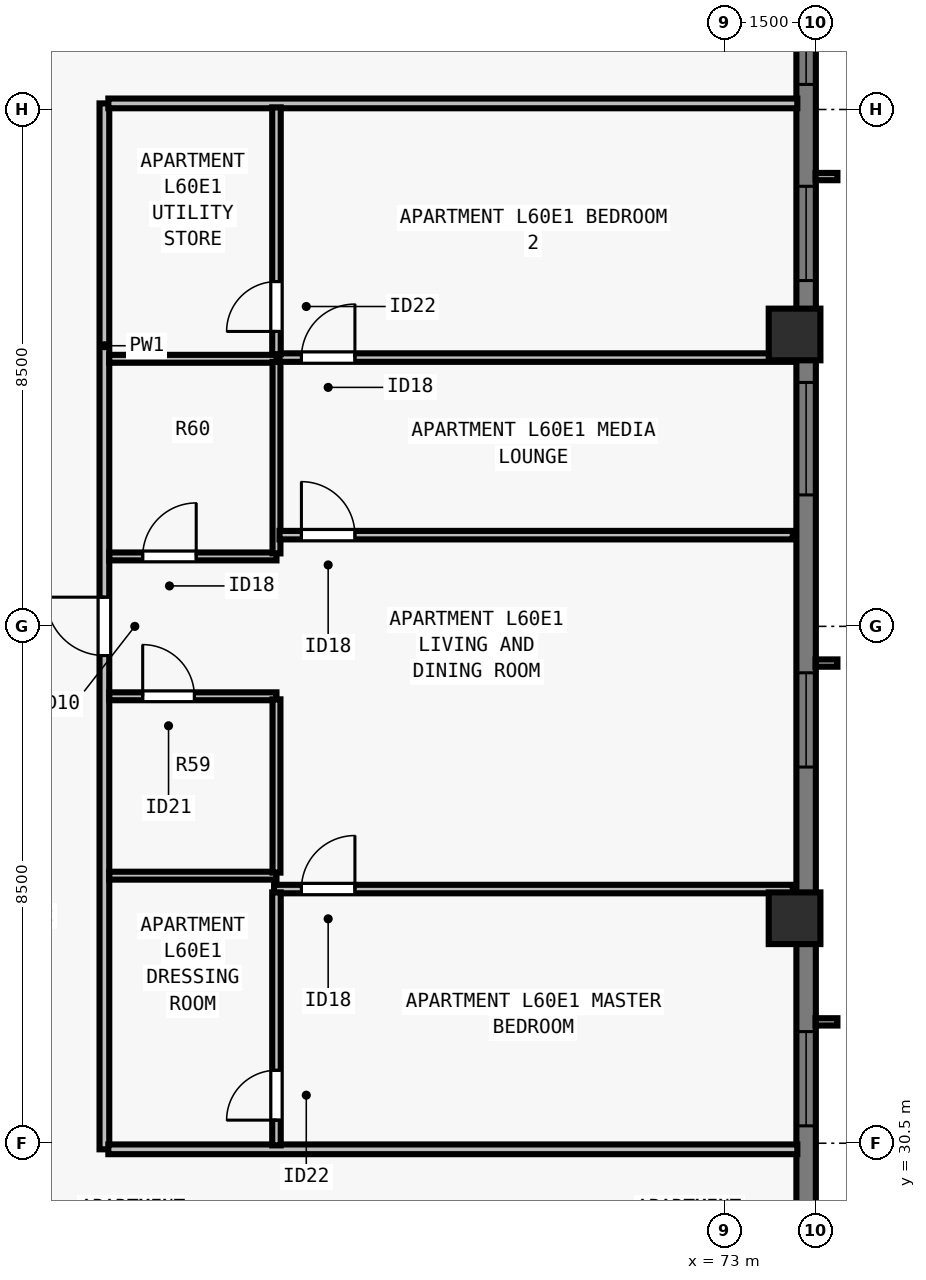
"""IFC4 building model, lengths in metres.
Left out: names, types, materials, properties, quantities, classifications, styles, units other than length and angle.
Written with IfcOpenShell. Run it as: python <this file> out.ifc"""

import sys

from ifc_helpers import new_model, si_unit, direction, frame, frame_2d, origin, origin_2d, place, context, subcontext, project, spatial, rectangle, extrude, element, fill, save


model = new_model("IFC4")
c1 = context("Model", 3, precision=1e-05, world=origin(), true_north=direction((0.0, 1.0)))
c2 = subcontext(c1, "Body", "Model", "MODEL_VIEW")
j1 = project(units=[si_unit("LENGTHUNIT", "METRE"), si_unit("PLANEANGLEUNIT", "RADIAN")], contexts=[c1])
p1 = place(None, origin())
s1 = spatial("IfcSite", under=j1, at=p1, CompositionType="ELEMENT")
p2 = place(p1, origin())
s2 = spatial("IfcBuilding", under=s1, at=p2, CompositionType="ELEMENT")
p3 = place(p2, frame((0.0, 0.0, 220.0)))
s3 = spatial("IfcBuildingStorey", under=s2, at=p3, CompositionType="ELEMENT", Elevation=220.0)
for number, where, z_axis, x_axis in (
    (1, (74.15, 34.2, 0.0), (0.0, 0.0, 1.0), (0.0, 1.0, 0.0)),
    (2, (74.15, 43.8, 0.0), (0.0, 0.0, 1.0), (0.0, 1.0, 0.0)),
):
    element("IfcColumn", number, at=place(p3, frame(where, z_axis=z_axis, x_axis=x_axis)), inside=s3, PredefinedType="COLUMN", context=c2, shape_type="SweptSolid", body=[
        extrude(rectangle(XDim=0.85, YDim=0.85, at=origin_2d()), origin(), (0.0, 0.0, 1.0), 3.5),
    ])
p4 = place(p3, frame((74.34, 56.5, 0.0), z_axis=(0.0, 0.0, 1.0), x_axis=(0.0, -1.0, 0.0)))
e3 = element("IfcWall", 3, at=p4, inside=s3, PredefinedType="SOLIDWALL", context=c2, shape_type="SweptSolid", body=[
    extrude(rectangle(XDim=34.702, YDim=0.32, at=frame_2d((17.351, 0.0))), origin(), (0.0, 0.0, 1.0), 3.29),
])
p5 = place(p4, frame((4.312, 0.0, 0.8)))
e4 = element("IfcOpeningElement", 4, at=p5, cuts=e3, PredefinedType="OPENING", context=c2, shape_type="SweptSolid", body=[
    extrude(rectangle(XDim=1.55, YDim=1.678, at=frame_2d((0.775, 0.839))), frame((0.0, 0.17, 0.0), z_axis=(0.0, -1.0, 0.0), x_axis=(1.0, 0.0, 0.0)), (0.0, 0.0, 1.0), 0.34),
])
p6 = place(p4, frame((6.738, 0.0, 0.8)))
e5 = element("IfcOpeningElement", 5, at=p6, cuts=e3, PredefinedType="OPENING", context=c2, shape_type="SweptSolid", body=[
    extrude(rectangle(XDim=1.85, YDim=1.678, at=frame_2d((0.925, 0.839))), frame((0.0, 0.17, 0.0), z_axis=(0.0, -1.0, 0.0), x_axis=(1.0, 0.0, 0.0)), (0.0, 0.0, 1.0), 0.34),
])
p7 = place(p4, frame((10.263, 0.0, 0.8)))
e6 = element("IfcOpeningElement", 6, at=p7, cuts=e3, PredefinedType="OPENING", context=c2, shape_type="SweptSolid", body=[
    extrude(rectangle(XDim=1.55, YDim=1.678, at=frame_2d((0.775, 0.839))), frame((0.0, 0.17, 0.0), z_axis=(0.0, -1.0, 0.0), x_axis=(1.0, 0.0, 0.0)), (0.0, 0.0, 1.0), 0.34),
])
p8 = place(p4, frame((13.488, 0.0, 0.8)))
e7 = element("IfcOpeningElement", 7, at=p8, cuts=e3, PredefinedType="OPENING", context=c2, shape_type="SweptSolid", body=[
    extrude(rectangle(XDim=1.85, YDim=1.678, at=frame_2d((0.925, 0.839))), frame((0.0, 0.17, 0.0), z_axis=(0.0, -1.0, 0.0), x_axis=(1.0, 0.0, 0.0)), (0.0, 0.0, 1.0), 0.34),
])
p9 = place(p4, frame((18.264, 0.0, 0.8)))
e8 = element("IfcOpeningElement", 8, at=p9, cuts=e3, PredefinedType="OPENING", context=c2, shape_type="SweptSolid", body=[
    extrude(rectangle(XDim=1.55, YDim=1.678, at=frame_2d((0.775, 0.839))), frame((0.0, 0.17, 0.0), z_axis=(0.0, -1.0, 0.0), x_axis=(1.0, 0.0, 0.0)), (0.0, 0.0, 1.0), 0.34),
])
p10 = place(p4, frame((24.164, 0.0, 0.8)))
e9 = element("IfcOpeningElement", 9, at=p10, cuts=e3, PredefinedType="OPENING", context=c2, shape_type="SweptSolid", body=[
    extrude(rectangle(XDim=1.55, YDim=1.678, at=frame_2d((0.775, 0.839))), frame((0.0, 0.17, 0.0), z_axis=(0.0, -1.0, 0.0), x_axis=(1.0, 0.0, 0.0)), (0.0, 0.0, 1.0), 0.34),
])
p11 = place(p3, frame((62.8, 30.4, 0.0), z_axis=(0.0, 0.0, 1.0), x_axis=(0.0, 1.0, 0.0)))
e10 = element("IfcWall", 10, at=p11, inside=s3, PredefinedType="PARTITIONING", context=c2, shape_type="SweptSolid", body=[
    extrude(rectangle(XDim=17.2, YDim=0.16, at=frame_2d((8.6, 0.0))), origin(), (0.0, 0.0, 1.0), 3.29),
])
p12 = place(p11, frame((8.12, 0.0, 0.0)))
e11 = element("IfcOpeningElement", 11, at=p12, cuts=e10, PredefinedType="OPENING", context=c2, shape_type="SweptSolid", body=[
    extrude(rectangle(XDim=0.96, YDim=2.18, at=frame_2d((0.48, 1.09))), frame((0.0, 0.09, 0.0), z_axis=(0.0, -1.0, 0.0), x_axis=(1.0, 0.0, 0.0)), (0.0, 0.0, 1.0), 0.18),
])
for number, where, z_axis, x_axis in (
    (12, (62.865, 30.4, 0.0), (0.0, 0.0, 1.0), (1.0, 0.0, 0.0)),
    (13, (62.865, 47.6, 0.0), (0.0, 0.0, 1.0), (1.0, 0.0, 0.0)),
):
    element("IfcWall", number, at=place(p3, frame(where, z_axis=z_axis, x_axis=x_axis)), inside=s3, PredefinedType="PARTITIONING", context=c2, shape_type="SweptSolid", body=[
        extrude(rectangle(XDim=11.33, YDim=0.16, at=frame_2d((5.665, 0.0))), origin(), (0.0, 0.0, 1.0), 3.29),
    ])
p13 = place(p3, frame((62.88, 34.9, 0.0), z_axis=(0.0, 0.0, 1.0), x_axis=(1.0, 0.0, 0.0)))
e14 = element("IfcWall", 14, at=p13, inside=s3, PredefinedType="PLUMBINGWALL", context=c2, shape_type="SweptSolid", body=[
    extrude(rectangle(XDim=2.75, YDim=0.13, at=frame_2d((1.375, 0.0))), origin(), (0.0, 0.0, 1.0), 3.29),
])
p14 = place(p3, frame((62.88, 37.85, 0.0), z_axis=(0.0, 0.0, 1.0), x_axis=(1.0, 0.0, 0.0)))
e15 = element("IfcWall", 15, at=p14, inside=s3, PredefinedType="PLUMBINGWALL", context=c2, shape_type="SweptSolid", body=[
    extrude(rectangle(XDim=2.75, YDim=0.13, at=frame_2d((1.375, 0.0))), origin(), (0.0, 0.0, 1.0), 3.29),
])
p15 = place(p14, frame((0.55, 0.0, 0.0)))
e16 = element("IfcOpeningElement", 16, at=p15, cuts=e15, PredefinedType="OPENING", context=c2, shape_type="SweptSolid", body=[
    extrude(rectangle(XDim=0.85, YDim=2.08, at=frame_2d((0.425, 1.04))), frame((0.0, 0.075, 0.0), z_axis=(0.0, -1.0, 0.0), x_axis=(1.0, 0.0, 0.0)), (0.0, 0.0, 1.0), 0.15),
])
p16 = place(p3, frame((65.63, 34.95, 0.0), z_axis=(0.0, 0.0, 1.0), x_axis=(0.0, 1.0, 0.0)))
e17 = element("IfcWall", 17, at=p16, inside=s3, PredefinedType="PLUMBINGWALL", context=c2, shape_type="SweptSolid", body=[
    extrude(rectangle(XDim=2.85, YDim=0.13, at=frame_2d((1.425, 0.0))), origin(), (0.0, 0.0, 1.0), 3.29),
])
p17 = place(p3, frame((62.88, 43.4, 0.0), z_axis=(0.0, 0.0, 1.0), x_axis=(1.0, 0.0, 0.0)))
e18 = element("IfcWall", 18, at=p17, inside=s3, PredefinedType="PLUMBINGWALL", context=c2, shape_type="SweptSolid", body=[
    extrude(rectangle(XDim=2.75, YDim=0.13, at=frame_2d((1.375, 0.0))), origin(), (0.0, 0.0, 1.0), 3.29),
])
p18 = place(p3, frame((62.88, 40.15, 0.0), z_axis=(0.0, 0.0, 1.0), x_axis=(1.0, 0.0, 0.0)))
e19 = element("IfcWall", 19, at=p18, inside=s3, PredefinedType="PLUMBINGWALL", context=c2, shape_type="SweptSolid", body=[
    extrude(rectangle(XDim=2.75, YDim=0.13, at=frame_2d((1.375, 0.0))), origin(), (0.0, 0.0, 1.0), 3.29),
])
p19 = place(p18, frame((0.55, 0.0, 0.0)))
e20 = element("IfcOpeningElement", 20, at=p19, cuts=e19, PredefinedType="OPENING", context=c2, shape_type="SweptSolid", body=[
    extrude(rectangle(XDim=0.88, YDim=2.1, at=frame_2d((0.44, 1.05))), frame((0.0, 0.075, 0.0), z_axis=(0.0, -1.0, 0.0), x_axis=(1.0, 0.0, 0.0)), (0.0, 0.0, 1.0), 0.15),
])
p20 = place(p3, frame((65.63, 40.2, 0.0), z_axis=(0.0, 0.0, 1.0), x_axis=(0.0, 1.0, 0.0)))
e21 = element("IfcWall", 21, at=p20, inside=s3, PredefinedType="PLUMBINGWALL", context=c2, shape_type="SweptSolid", body=[
    extrude(rectangle(XDim=3.15, YDim=0.13, at=frame_2d((1.575, 0.0))), origin(), (0.0, 0.0, 1.0), 3.29),
])
p21 = place(p3, frame((65.59, 34.68, 0.0), z_axis=(0.0, 0.0, 1.0), x_axis=(1.0, 0.0, 0.0)))
e22 = element("IfcWall", 22, at=p21, inside=s3, PredefinedType="PARTITIONING", context=c2, shape_type="SweptSolid", body=[
    extrude(rectangle(XDim=8.53, YDim=0.14, at=frame_2d((4.265, 0.0))), origin(), (0.0, 0.0, 1.0), 3.29),
])
p22 = place(p21, frame((0.45, 0.0, 0.0)))
e23 = element("IfcOpeningElement", 23, at=p22, cuts=e22, PredefinedType="OPENING", context=c2, shape_type="SweptSolid", body=[
    extrude(rectangle(XDim=0.88, YDim=2.1, at=frame_2d((0.44, 1.05))), frame((0.0, 0.08, 0.0), z_axis=(0.0, -1.0, 0.0), x_axis=(1.0, 0.0, 0.0)), (0.0, 0.0, 1.0), 0.16),
])
p23 = place(p3, frame((65.63, 30.465, 0.0), z_axis=(0.0, 0.0, 1.0), x_axis=(0.0, 1.0, 0.0)))
e24 = element("IfcWall", 24, at=p23, inside=s3, PredefinedType="PARTITIONING", context=c2, shape_type="SweptSolid", body=[
    extrude(rectangle(XDim=4.16, YDim=0.14, at=frame_2d((2.08, 0.0))), origin(), (0.0, 0.0, 1.0), 3.29),
])
p24 = place(p23, frame((0.415, 0.0, 0.0)))
e25 = element("IfcOpeningElement", 25, at=p24, cuts=e24, PredefinedType="OPENING", context=c2, shape_type="SweptSolid", body=[
    extrude(rectangle(XDim=0.82, YDim=2.1, at=frame_2d((0.41, 1.05))), frame((0.0, 0.08, 0.0), z_axis=(0.0, -1.0, 0.0), x_axis=(1.0, 0.0, 0.0)), (0.0, 0.0, 1.0), 0.16),
])
p25 = place(p3, frame((65.68, 43.42, 0.0), z_axis=(0.0, 0.0, 1.0), x_axis=(1.0, 0.0, 0.0)))
e26 = element("IfcWall", 26, at=p25, inside=s3, PredefinedType="PARTITIONING", context=c2, shape_type="SweptSolid", body=[
    extrude(rectangle(XDim=8.44, YDim=0.14, at=frame_2d((4.22, 0.0))), origin(), (0.0, 0.0, 1.0), 3.29),
])
p26 = place(p25, frame((0.36, 0.0, 0.0)))
e27 = element("IfcOpeningElement", 27, at=p26, cuts=e26, PredefinedType="OPENING", context=c2, shape_type="SweptSolid", body=[
    extrude(rectangle(XDim=0.88, YDim=2.1, at=frame_2d((0.44, 1.05))), frame((0.0, 0.08, 0.0), z_axis=(0.0, -1.0, 0.0), x_axis=(1.0, 0.0, 0.0)), (0.0, 0.0, 1.0), 0.16),
])
p27 = place(p3, frame((65.63, 43.475, 0.0), z_axis=(0.0, 0.0, 1.0), x_axis=(0.0, 1.0, 0.0)))
e28 = element("IfcWall", 28, at=p27, inside=s3, PredefinedType="PARTITIONING", context=c2, shape_type="SweptSolid", body=[
    extrude(rectangle(XDim=4.06, YDim=0.14, at=frame_2d((2.03, 0.0))), origin(), (0.0, 0.0, 1.0), 3.29),
])
p28 = place(p27, frame((0.375, 0.0, 0.0)))
e29 = element("IfcOpeningElement", 29, at=p28, cuts=e28, PredefinedType="OPENING", context=c2, shape_type="SweptSolid", body=[
    extrude(rectangle(XDim=0.82, YDim=2.1, at=frame_2d((0.41, 1.05))), frame((0.0, 0.08, 0.0), z_axis=(0.0, -1.0, 0.0), x_axis=(1.0, 0.0, 0.0)), (0.0, 0.0, 1.0), 0.16),
])
p29 = place(p3, frame((65.68, 40.5, 0.0), z_axis=(0.0, 0.0, 1.0), x_axis=(1.0, 0.0, 0.0)))
e30 = element("IfcWall", 30, at=p29, inside=s3, PredefinedType="PARTITIONING", context=c2, shape_type="SweptSolid", body=[
    extrude(rectangle(XDim=8.44, YDim=0.14, at=frame_2d((4.22, 0.0))), origin(), (0.0, 0.0, 1.0), 3.29),
])
p30 = place(p29, frame((0.36, 0.0, 0.0)))
e31 = element("IfcOpeningElement", 31, at=p30, cuts=e30, PredefinedType="OPENING", context=c2, shape_type="SweptSolid", body=[
    extrude(rectangle(XDim=0.88, YDim=2.1, at=frame_2d((0.44, 1.05))), frame((0.0, 0.08, 0.0), z_axis=(0.0, -1.0, 0.0), x_axis=(1.0, 0.0, 0.0)), (0.0, 0.0, 1.0), 0.16),
])
p31 = place(p6, origin())
e32 = element("IfcWindow", 32, at=p31, inside=s3, PartitioningType="SINGLE_PANEL", PredefinedType="WINDOW", context=c2, shape_type="SweptSolid", body=[
    extrude(rectangle(XDim=1.85, YDim=1.678, at=frame_2d((0.925, 0.839))), frame((0.0, -0.05, 0.0), z_axis=(0.0, -1.0, 0.0), x_axis=(1.0, 0.0, 0.0)), (0.0, 0.0, 1.0), 0.06),
])
fill(e5, e32)
p32 = place(p7, origin())
e33 = element("IfcWindow", 33, at=p32, inside=s3, PartitioningType="SINGLE_PANEL", PredefinedType="WINDOW", context=c2, shape_type="SweptSolid", body=[
    extrude(rectangle(XDim=1.55, YDim=1.678, at=frame_2d((0.775, 0.839))), frame((0.0, -0.05, 0.0), z_axis=(0.0, -1.0, 0.0), x_axis=(1.0, 0.0, 0.0)), (0.0, 0.0, 1.0), 0.06),
])
fill(e6, e33)
p33 = place(p8, origin())
e34 = element("IfcWindow", 34, at=p33, inside=s3, PartitioningType="SINGLE_PANEL", PredefinedType="WINDOW", context=c2, shape_type="SweptSolid", body=[
    extrude(rectangle(XDim=1.85, YDim=1.678, at=frame_2d((0.925, 0.839))), frame((0.0, -0.05, 0.0), z_axis=(0.0, -1.0, 0.0), x_axis=(1.0, 0.0, 0.0)), (0.0, 0.0, 1.0), 0.06),
])
fill(e7, e34)
p34 = place(p9, origin())
e35 = element("IfcWindow", 35, at=p34, inside=s3, PartitioningType="SINGLE_PANEL", PredefinedType="WINDOW", context=c2, shape_type="SweptSolid", body=[
    extrude(rectangle(XDim=1.55, YDim=1.678, at=frame_2d((0.775, 0.839))), frame((0.0, -0.05, 0.0), z_axis=(0.0, -1.0, 0.0), x_axis=(1.0, 0.0, 0.0)), (0.0, 0.0, 1.0), 0.06),
])
fill(e8, e35)
p35 = place(p10, origin())
e36 = element("IfcWindow", 36, at=p35, inside=s3, PartitioningType="SINGLE_PANEL", PredefinedType="WINDOW", context=c2, shape_type="SweptSolid", body=[
    extrude(rectangle(XDim=1.55, YDim=1.678, at=frame_2d((0.775, 0.839))), frame((0.0, -0.05, 0.0), z_axis=(0.0, -1.0, 0.0), x_axis=(1.0, 0.0, 0.0)), (0.0, 0.0, 1.0), 0.06),
])
fill(e9, e36)
p36 = place(p15, origin())
e37 = element("IfcDoor", 37, at=p36, inside=s3, OperationType="SINGLE_SWING_LEFT", PredefinedType="DOOR", context=c2, shape_type="SweptSolid", body=[
    extrude(rectangle(XDim=0.85, YDim=2.08, at=frame_2d((0.425, 1.04))), frame((0.0, 0.025, 0.0), z_axis=(0.0, -1.0, 0.0), x_axis=(1.0, 0.0, 0.0)), (0.0, 0.0, 1.0), 0.05),
])
fill(e16, e37)
p37 = place(p19, origin())
e38 = element("IfcDoor", 38, at=p37, inside=s3, OperationType="SINGLE_SWING_RIGHT", PredefinedType="DOOR", context=c2, shape_type="SweptSolid", body=[
    extrude(rectangle(XDim=0.88, YDim=2.1, at=frame_2d((0.44, 1.05))), frame((0.0, 0.025, 0.0), z_axis=(0.0, -1.0, 0.0), x_axis=(1.0, 0.0, 0.0)), (0.0, 0.0, 1.0), 0.05),
])
fill(e20, e38)
p38 = place(p24, origin())
e39 = element("IfcDoor", 39, at=p38, inside=s3, OperationType="SINGLE_SWING_LEFT", PredefinedType="DOOR", context=c2, shape_type="SweptSolid", body=[
    extrude(rectangle(XDim=0.82, YDim=2.1, at=frame_2d((0.41, 1.05))), frame((0.0, 0.025, 0.0), z_axis=(0.0, -1.0, 0.0), x_axis=(1.0, 0.0, 0.0)), (0.0, 0.0, 1.0), 0.05),
])
fill(e25, e39)
p39 = place(p22, origin())
e40 = element("IfcDoor", 40, at=p39, inside=s3, OperationType="SINGLE_SWING_RIGHT", PredefinedType="DOOR", context=c2, shape_type="SweptSolid", body=[
    extrude(rectangle(XDim=0.88, YDim=2.1, at=frame_2d((0.44, 1.05))), frame((0.0, 0.025, 0.0), z_axis=(0.0, -1.0, 0.0), x_axis=(1.0, 0.0, 0.0)), (0.0, 0.0, 1.0), 0.05),
])
fill(e23, e40)
p40 = place(p28, origin())
e41 = element("IfcDoor", 41, at=p40, inside=s3, OperationType="SINGLE_SWING_LEFT", PredefinedType="DOOR", context=c2, shape_type="SweptSolid", body=[
    extrude(rectangle(XDim=0.82, YDim=2.1, at=frame_2d((0.41, 1.05))), frame((0.0, 0.025, 0.0), z_axis=(0.0, -1.0, 0.0), x_axis=(1.0, 0.0, 0.0)), (0.0, 0.0, 1.0), 0.05),
])
fill(e29, e41)
p41 = place(p26, origin())
e42 = element("IfcDoor", 42, at=p41, inside=s3, OperationType="SINGLE_SWING_RIGHT", PredefinedType="DOOR", context=c2, shape_type="SweptSolid", body=[
    extrude(rectangle(XDim=0.88, YDim=2.1, at=frame_2d((0.44, 1.05))), frame((0.0, 0.025, 0.0), z_axis=(0.0, -1.0, 0.0), x_axis=(1.0, 0.0, 0.0)), (0.0, 0.0, 1.0), 0.05),
])
fill(e27, e42)
p42 = place(p30, origin())
e43 = element("IfcDoor", 43, at=p42, inside=s3, OperationType="SINGLE_SWING_LEFT", PredefinedType="DOOR", context=c2, shape_type="SweptSolid", body=[
    extrude(rectangle(XDim=0.88, YDim=2.1, at=frame_2d((0.44, 1.05))), frame((0.0, 0.025, 0.0), z_axis=(0.0, -1.0, 0.0), x_axis=(1.0, 0.0, 0.0)), (0.0, 0.0, 1.0), 0.05),
])
fill(e31, e43)
p43 = place(p12, origin())
e44 = element("IfcDoor", 44, at=p43, inside=s3, OperationType="SINGLE_SWING_RIGHT", PredefinedType="DOOR", context=c2, shape_type="SweptSolid", body=[
    extrude(rectangle(XDim=0.96, YDim=2.18, at=frame_2d((0.48, 1.09))), frame((0.0, 0.025, 0.0), z_axis=(0.0, -1.0, 0.0), x_axis=(1.0, 0.0, 0.0)), (0.0, 0.0, 1.0), 0.05),
])
fill(e11, e44)
save(model, sys.argv[1])
